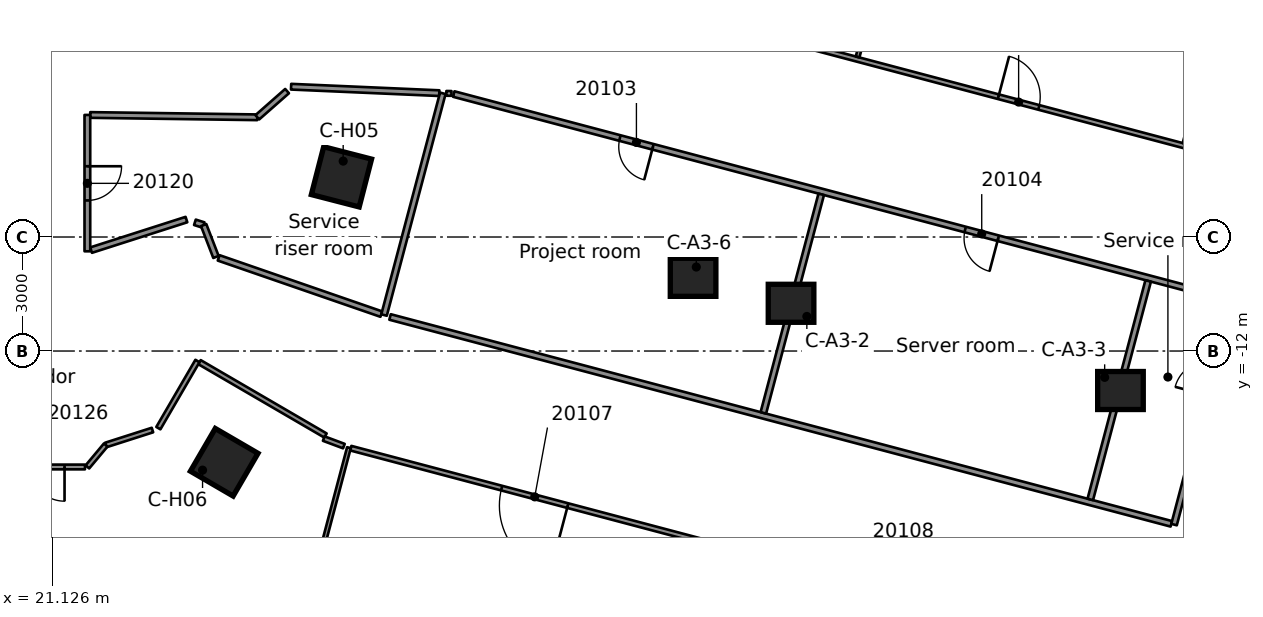
"""IFC4 building model, lengths in metres.
Left out: names, types, materials, properties, quantities, classifications, styles, units other than length and angle.
Written with IfcOpenShell. Run it as: python <this file> out.ifc"""

import sys

from ifc_helpers import new_model, si_unit, direction, frame, frame_2d, origin, origin_2d, place, context, subcontext, project, spatial, rectangle, extrude, element, fill, save


model = new_model("IFC4")
c1 = context("Model", 3, precision=1e-05, world=origin(), true_north=direction((0.0, 1.0)))
c2 = subcontext(c1, "Body", "Model", "MODEL_VIEW")
j1 = project(units=[si_unit("LENGTHUNIT", "METRE"), si_unit("PLANEANGLEUNIT", "RADIAN")], contexts=[c1])
p1 = place(None, origin())
s1 = spatial("IfcSite", under=j1, at=p1, CompositionType="ELEMENT")
p2 = place(p1, origin())
s2 = spatial("IfcBuilding", under=s1, at=p2, CompositionType="ELEMENT")
p3 = place(p2, frame((0.0, 0.0, 102.2)))
s3 = spatial("IfcBuildingStorey", under=s2, at=p3, CompositionType="ELEMENT", Elevation=102.2)
for number, where, z_axis, x_axis in (
    (1, (40.568, -10.744, 0.0), (0.0, 0.0, 1.0), (1.0, 0.0, 0.0)),
    (2, (49.236, -13.039, 0.0), (0.0, 0.0, 1.0), (1.0, 0.0, 0.0)),
    (3, (37.99, -10.061, 0.0), (0.0, 0.0, 1.0), (1.0, 0.0, 0.0)),
):
    element("IfcColumn", number, at=place(p3, frame(where, z_axis=z_axis, x_axis=x_axis)), inside=s3, PredefinedType="COLUMN", context=c2, shape_type="SweptSolid", body=[
        extrude(rectangle(XDim=1.2, YDim=1.0, at=origin_2d()), origin(), (0.0, 0.0, 1.0), 3.5),
    ])
for number, where, z_axis, x_axis in (
    (4, (28.737, -7.417, 0.0), (0.0, 0.0, 1.0), (0.968, -0.25, 0.0)),
    (5, (25.652, -14.927, 0.0), (0.0, 0.0, 1.0), (0.864, -0.503, 0.0)),
):
    element("IfcColumn", number, at=place(p3, frame(where, z_axis=z_axis, x_axis=x_axis)), inside=s3, PredefinedType="COLUMN", context=c2, shape_type="SweptSolid", body=[
        extrude(rectangle(XDim=1.3, YDim=1.3, at=origin_2d()), origin(), (0.0, 0.0, 1.0), 3.5),
    ])
p4 = place(p3, frame((25.002, -12.293, 0.0), z_axis=(0.0, 0.0, 1.0), x_axis=(0.864207961663, -0.503134772201, 0.0)))
e6 = element("IfcWall", 6, at=p4, inside=s3, PredefinedType="PARTITIONING", context=c2, shape_type="SweptSolid", body=[
    extrude(rectangle(XDim=3.836, YDim=0.125, at=frame_2d((1.918, 0.0))), origin(), (0.0, 0.0, 1.0), 3.08),
])
p5 = place(p3, frame((28.271, -14.304, 0.0), z_axis=(0.0, 0.0, 1.0), x_axis=(0.936771746221, -0.34994098857, 0.0)))
e7 = element("IfcWall", 7, at=p5, inside=s3, PredefinedType="PARTITIONING", context=c2, shape_type="SweptSolid", body=[
    extrude(rectangle(XDim=0.566, YDim=0.125, at=frame_2d((0.283, 0.0))), origin(), (0.0, 0.0, 1.0), 3.08),
])
p6 = place(p3, frame((29.787, -11.029, 0.0), z_axis=(0.0, 0.0, 1.0), x_axis=(-0.945116082169, 0.326734741381, 0.0)))
e8 = element("IfcWall", 8, at=p6, inside=s3, PredefinedType="PARTITIONING", context=c2, shape_type="SweptSolid", body=[
    extrude(rectangle(XDim=4.53, YDim=0.15, at=frame_2d((2.265, 0.0))), origin(), (0.0, 0.0, 1.0), 3.08),
])
p7 = place(p3, frame((24.881, -8.613, 0.0), z_axis=(0.0, 0.0, 1.0), x_axis=(0.953138161639, -0.302535361285, 0.0)))
e9 = element("IfcWall", 9, at=p7, inside=s3, PredefinedType="PARTITIONING", context=c2, shape_type="SweptSolid", body=[
    extrude(rectangle(XDim=0.241, YDim=0.15, at=frame_2d((0.121, 0.0))), origin(), (0.0, 0.0, 1.0), 3.08),
])
p8 = place(p3, frame((52.916, -20.892, 0.0), z_axis=(0.0, 0.0, 1.0), x_axis=(-0.966698340064, 0.255918579469, 0.0)))
e10 = element("IfcWall", 10, at=p8, inside=s3, PredefinedType="PARTITIONING", context=c2, shape_type="SweptSolid", body=[
    extrude(rectangle(XDim=24.759, YDim=0.125, at=frame_2d((12.379, 0.0))), origin(), (0.0, 0.0, 1.0), 3.08),
])
p9 = place(p8, frame((2.351, 0.0, 0.0)))
e11 = element("IfcOpeningElement", 11, at=p9, cuts=e10, PredefinedType="OPENING", context=c2, shape_type="SweptSolid", body=[
    extrude(rectangle(XDim=0.9, YDim=2.1, at=frame_2d((0.45, 1.05))), frame((0.0, 0.073, 0.0), z_axis=(0.0, -1.0, 0.0), x_axis=(1.0, 0.0, 0.0)), (0.0, 0.0, 1.0), 0.145),
])
p10 = place(p8, frame((18.851, 0.0, 0.0)))
e12 = element("IfcOpeningElement", 12, at=p10, cuts=e10, PredefinedType="OPENING", context=c2, shape_type="SweptSolid", body=[
    extrude(rectangle(XDim=1.8, YDim=2.1, at=frame_2d((0.9, 1.05))), frame((0.0, 0.073, 0.0), z_axis=(0.0, -1.0, 0.0), x_axis=(1.0, 0.0, 0.0)), (0.0, 0.0, 1.0), 0.145),
])
p11 = place(p8, frame((9.451, 0.0, 0.0)))
e13 = element("IfcOpeningElement", 13, at=p11, cuts=e10, PredefinedType="OPENING", context=c2, shape_type="SweptSolid", body=[
    extrude(rectangle(XDim=1.1, YDim=2.1, at=frame_2d((0.55, 1.05))), frame((0.0, 0.073, 0.0), z_axis=(0.0, -1.0, 0.0), x_axis=(1.0, 0.0, 0.0)), (0.0, 0.0, 1.0), 0.145),
])
p12 = place(p3, frame((30.016, -11.104, 0.0), z_axis=(0.0, 0.0, 1.0), x_axis=(0.966689773776, -0.255950935293, 0.0)))
e14 = element("IfcWall", 14, at=p12, inside=s3, PredefinedType="PARTITIONING", context=c2, shape_type="SweptSolid", body=[
    extrude(rectangle(XDim=21.266, YDim=0.15, at=frame_2d((10.633, 0.0))), origin(), (0.0, 0.0, 1.0), 3.08),
])
p13 = place(p3, frame((52.134, -10.652, 0.0), z_axis=(0.0, 0.0, 1.0), x_axis=(-0.966671200414, 0.25602107392, 0.0)))
e15 = element("IfcWall", 15, at=p13, inside=s3, PredefinedType="PARTITIONING", context=c2, shape_type="SweptSolid", body=[
    extrude(rectangle(XDim=21.147, YDim=0.15, at=frame_2d((10.573, 0.0))), origin(), (0.0, 0.0, 1.0), 3.08),
])
p14 = place(p13, frame((15.724, 0.0, 0.0)))
e16 = element("IfcOpeningElement", 16, at=p14, cuts=e15, PredefinedType="OPENING", context=c2, shape_type="SweptSolid", body=[
    extrude(rectangle(XDim=0.9, YDim=2.1, at=frame_2d((0.45, 1.05))), frame((0.0, 0.085, 0.0), z_axis=(0.0, -1.0, 0.0), x_axis=(1.0, 0.0, 0.0)), (0.0, 0.0, 1.0), 0.17),
])
p15 = place(p13, frame((6.324, 0.0, 0.0)))
e17 = element("IfcOpeningElement", 17, at=p15, cuts=e15, PredefinedType="OPENING", context=c2, shape_type="SweptSolid", body=[
    extrude(rectangle(XDim=0.9, YDim=2.1, at=frame_2d((0.45, 1.05))), frame((0.0, 0.085, 0.0), z_axis=(0.0, -1.0, 0.0), x_axis=(1.0, 0.0, 0.0)), (0.0, 0.0, 1.0), 0.17),
])
p16 = place(p3, frame((32.976, -1.853, 0.0), z_axis=(0.0, 0.0, 1.0), x_axis=(0.966679949131, -0.255988038682, 0.0)))
e18 = element("IfcWall", 18, at=p16, inside=s3, PredefinedType="PARTITIONING", context=c2, shape_type="SweptSolid", body=[
    extrude(rectangle(XDim=24.387, YDim=0.125, at=frame_2d((12.194, 0.0))), origin(), (0.0, 0.0, 1.0), 3.08),
])
p17 = place(p16, frame((3.85, 0.0, 0.0)))
e19 = element("IfcOpeningElement", 19, at=p17, cuts=e18, PredefinedType="OPENING", context=c2, shape_type="SweptSolid", body=[
    extrude(rectangle(XDim=1.8, YDim=2.1, at=frame_2d((0.9, 1.05))), frame((0.0, 0.073, 0.0), z_axis=(0.0, -1.0, 0.0), x_axis=(1.0, 0.0, 0.0)), (0.0, 0.0, 1.0), 0.145),
])
p18 = place(p16, frame((13.499, 0.0, 0.0)))
e20 = element("IfcOpeningElement", 20, at=p18, cuts=e18, PredefinedType="OPENING", context=c2, shape_type="SweptSolid", body=[
    extrude(rectangle(XDim=1.1, YDim=2.1, at=frame_2d((0.55, 1.05))), frame((0.0, 0.073, 0.0), z_axis=(0.0, -1.0, 0.0), x_axis=(1.0, 0.0, 0.0)), (0.0, 0.0, 1.0), 0.145),
])
p19 = place(p3, frame((27.412, -5.045, 0.0), z_axis=(0.0, 0.0, 1.0), x_axis=(0.999048944575, -0.043602824945, 0.0)))
e21 = element("IfcWall", 21, at=p19, inside=s3, PredefinedType="PARTITIONING", context=c2, shape_type="SweptSolid", body=[
    extrude(rectangle(XDim=3.903, YDim=0.15, at=frame_2d((1.951, 0.0))), origin(), (0.0, 0.0, 1.0), 3.08),
])
p20 = place(p3, frame((22.126, -5.789, 0.0), z_axis=(0.0, 0.0, 1.0), x_axis=(0.999903670382, -0.013879839955, 0.0)))
e22 = element("IfcWall", 22, at=p20, inside=s3, PredefinedType="PARTITIONING", context=c2, shape_type="SweptSolid", body=[
    extrude(rectangle(XDim=4.397, YDim=0.15, at=frame_2d((2.199, 0.0))), origin(), (0.0, 0.0, 1.0), 3.08),
])
p21 = place(p3, frame((31.497, -5.22, 0.0), z_axis=(0.0, 0.0, 1.0), x_axis=(0.999895375943, -0.014465032563, 0.0)))
e23 = element("IfcWall", 23, at=p21, inside=s3, PredefinedType="PARTITIONING", context=c2, shape_type="SweptSolid", body=[
    extrude(rectangle(XDim=0.135, YDim=0.125, at=frame_2d((0.067, 0.0))), origin(), (0.0, 0.0, 1.0), 3.08),
])
p22 = place(p3, frame((21.988, -15.051, 0.0), z_axis=(0.0, 0.0, 1.0), x_axis=(-1.0, 0.0, 0.0)))
e24 = element("IfcWall", 24, at=p22, inside=s3, PredefinedType="PARTITIONING", context=c2, shape_type="SweptSolid", body=[
    extrude(rectangle(XDim=10.997, YDim=0.125, at=frame_2d((5.499, 0.0))), origin(), (0.0, 0.0, 1.0), 3.08),
])
p23 = place(p22, frame((6.087, 0.0, 0.0)))
e25 = element("IfcOpeningElement", 25, at=p23, cuts=e24, PredefinedType="OPENING", context=c2, shape_type="SweptSolid", body=[
    extrude(rectangle(XDim=0.9, YDim=2.1, at=frame_2d((0.45, 1.05))), frame((0.0, 0.073, 0.0), z_axis=(0.0, -1.0, 0.0), x_axis=(1.0, 0.0, 0.0)), (0.0, 0.0, 1.0), 0.145),
])
p24 = place(p22, frame((0.538, 0.0, 0.0)))
e26 = element("IfcOpeningElement", 26, at=p24, cuts=e24, PredefinedType="OPENING", context=c2, shape_type="SweptSolid", body=[
    extrude(rectangle(XDim=0.9, YDim=2.1, at=frame_2d((0.45, 1.05))), frame((0.0, 0.073, 0.0), z_axis=(0.0, -1.0, 0.0), x_axis=(1.0, 0.0, 0.0)), (0.0, 0.0, 1.0), 0.145),
])
p25 = place(p3, frame((22.534, -14.473, 0.0), z_axis=(0.0, 0.0, 1.0), x_axis=(0.952378042639, 0.304919766331, 0.0)))
e27 = element("IfcWall", 27, at=p25, inside=s3, PredefinedType="PARTITIONING", context=c2, shape_type="SweptSolid", body=[
    extrude(rectangle(XDim=1.292, YDim=0.125, at=frame_2d((0.646, 0.0))), origin(), (0.0, 0.0, 1.0), 3.08),
])
p26 = place(p3, frame((22.149, -9.345, 0.0), z_axis=(0.0, 0.0, 1.0), x_axis=(0.952306801054, 0.305142190899, 0.0)))
e28 = element("IfcWall", 28, at=p26, inside=s3, PredefinedType="PARTITIONING", context=c2, shape_type="SweptSolid", body=[
    extrude(rectangle(XDim=2.635, YDim=0.15, at=frame_2d((1.317, 0.0))), origin(), (0.0, 0.0, 1.0), 3.08),
])
p27 = place(p3, frame((23.919, -14.029, 0.0), z_axis=(0.0, 0.0, 1.0), x_axis=(0.503232487024, 0.864151065499, 0.0)))
e29 = element("IfcWall", 29, at=p27, inside=s3, PredefinedType="PARTITIONING", context=c2, shape_type="SweptSolid", body=[
    extrude(rectangle(XDim=2.045, YDim=0.125, at=frame_2d((1.022, 0.0))), origin(), (0.0, 0.0, 1.0), 3.08),
])
p28 = place(p3, frame((25.435, -9.525, 0.0), z_axis=(0.0, 0.0, 1.0), x_axis=(-0.360270423637, 0.932847909282, 0.0)))
e30 = element("IfcWall", 30, at=p28, inside=s3, PredefinedType="PARTITIONING", context=c2, shape_type="SweptSolid", body=[
    extrude(rectangle(XDim=0.899, YDim=0.15, at=frame_2d((0.45, 0.0))), origin(), (0.0, 0.0, 1.0), 3.08),
])
p29 = place(p3, frame((50.646, -16.567, 0.0), z_axis=(0.0, 0.0, 1.0), x_axis=(0.256234173413, 0.966614736271, 0.0)))
e31 = element("IfcWall", 31, at=p29, inside=s3, PredefinedType="PARTITIONING", context=c2, shape_type="SweptSolid", body=[
    extrude(rectangle(XDim=1.787, YDim=0.15, at=frame_2d((0.894, 0.0))), origin(), (0.0, 0.0, 1.0), 3.08),
])
p30 = place(p3, frame((48.442, -15.905, 0.0), z_axis=(0.0, 0.0, 1.0), x_axis=(0.256111443265, 0.96664726174, 0.0)))
e32 = element("IfcWall", 32, at=p30, inside=s3, PredefinedType="PARTITIONING", context=c2, shape_type="SweptSolid", body=[
    extrude(rectangle(XDim=5.947, YDim=0.15, at=frame_2d((2.974, 0.0))), origin(), (0.0, 0.0, 1.0), 3.08),
])
p31 = place(p3, frame((50.922, -6.542, 0.0), z_axis=(0.0, 0.0, 1.0), x_axis=(0.25602342398, 0.966670578001, 0.0)))
e33 = element("IfcWall", 33, at=p31, inside=s3, PredefinedType="PARTITIONING", context=c2, shape_type="SweptSolid", body=[
    extrude(rectangle(XDim=13.537, YDim=0.1, at=frame_2d((6.769, 0.0))), origin(), (0.0, 0.0, 1.0), 3.08),
])
p32 = place(p3, frame((39.839, -13.627, 0.0), z_axis=(0.0, 0.0, 1.0), x_axis=(0.256032445662, 0.966668188557, 0.0)))
e34 = element("IfcWall", 34, at=p32, inside=s3, PredefinedType="PARTITIONING", context=c2, shape_type="SweptSolid", body=[
    extrude(rectangle(XDim=5.948, YDim=0.15, at=frame_2d((2.974, 0.0))), origin(), (0.0, 0.0, 1.0), 3.08),
])
p33 = place(p3, frame((42.319, -4.263, 0.0), z_axis=(0.0, 0.0, 1.0), x_axis=(0.255956011123, 0.966688429832, 0.0)))
e35 = element("IfcWall", 35, at=p33, inside=s3, PredefinedType="PARTITIONING", context=c2, shape_type="SweptSolid", body=[
    extrude(rectangle(XDim=13.537, YDim=0.1, at=frame_2d((6.769, 0.0))), origin(), (0.0, 0.0, 1.0), 3.08),
])
p34 = place(p3, frame((25.453, -27.689, 0.0), z_axis=(0.0, 0.0, 1.0), x_axis=(0.255987300487, 0.966680144613, 0.0)))
e36 = element("IfcWall", 36, at=p34, inside=s3, PredefinedType="PARTITIONING", context=c2, shape_type="SweptSolid", body=[
    extrude(rectangle(XDim=13.599, YDim=0.1, at=frame_2d((6.8, 0.0))), origin(), (0.0, 0.0, 1.0), 3.08),
])
p35 = place(p3, frame((29.858, -11.053, 0.0), z_axis=(0.0, 0.0, 1.0), x_axis=(0.256179404859, 0.966629252882, 0.0)))
e37 = element("IfcWall", 37, at=p35, inside=s3, PredefinedType="PARTITIONING", context=c2, shape_type="SweptSolid", body=[
    extrude(rectangle(XDim=6.035, YDim=0.15, at=frame_2d((3.018, 0.0))), origin(), (0.0, 0.0, 1.0), 3.08),
])
p36 = place(p3, frame((26.523, -5.85, 0.0), z_axis=(0.0, 0.0, 1.0), x_axis=(0.750616003207, 0.660738689446, 0.0)))
e38 = element("IfcWall", 38, at=p36, inside=s3, PredefinedType="PARTITIONING", context=c2, shape_type="SweptSolid", body=[
    extrude(rectangle(XDim=1.043, YDim=0.15, at=frame_2d((0.521, 0.0))), origin(), (0.0, 0.0, 1.0), 3.08),
])
p37 = place(p3, frame((22.051, -15.05, 0.0), z_axis=(0.0, 0.0, 1.0), x_axis=(0.641714843871, 0.766943321997, 0.0)))
e39 = element("IfcWall", 39, at=p37, inside=s3, PredefinedType="PARTITIONING", context=c2, shape_type="SweptSolid", body=[
    extrude(rectangle(XDim=0.752, YDim=0.125, at=frame_2d((0.376, 0.0))), origin(), (0.0, 0.0, 1.0), 3.08),
])
p38 = place(p3, frame((22.051, -5.788, 0.0), z_axis=(0.0, 0.0, 1.0), x_axis=(0.0, -1.0, 0.0)))
e40 = element("IfcWall", 40, at=p38, inside=s3, PredefinedType="PARTITIONING", context=c2, shape_type="SweptSolid", body=[
    extrude(rectangle(XDim=3.588, YDim=0.15, at=frame_2d((1.794, 0.0))), origin(), (0.0, 0.0, 1.0), 3.08),
])
p39 = place(p38, frame((1.35, 0.0, 0.0)))
e41 = element("IfcOpeningElement", 41, at=p39, cuts=e40, PredefinedType="OPENING", context=c2, shape_type="SweptSolid", body=[
    extrude(rectangle(XDim=0.9, YDim=2.1, at=frame_2d((0.45, 1.05))), frame((0.0, 0.085, 0.0), z_axis=(0.0, -1.0, 0.0), x_axis=(1.0, 0.0, 0.0)), (0.0, 0.0, 1.0), 0.17),
])
p40 = place(p18, origin())
e42 = element("IfcDoor", 42, at=p40, inside=s3, OperationType="SINGLE_SWING_RIGHT", PredefinedType="DOOR", context=c2, shape_type="SweptSolid", body=[
    extrude(rectangle(XDim=1.1, YDim=2.1, at=frame_2d((0.55, 1.05))), frame((0.0, 0.025, 0.0), z_axis=(0.0, -1.0, 0.0), x_axis=(1.0, 0.0, 0.0)), (0.0, 0.0, 1.0), 0.05),
])
fill(e20, e42)
p41 = place(p14, origin())
e43 = element("IfcDoor", 43, at=p41, inside=s3, OperationType="SINGLE_SWING_RIGHT", PredefinedType="DOOR", context=c2, shape_type="SweptSolid", body=[
    extrude(rectangle(XDim=0.9, YDim=2.1, at=frame_2d((0.45, 1.05))), frame((0.0, 0.025, 0.0), z_axis=(0.0, -1.0, 0.0), x_axis=(1.0, 0.0, 0.0)), (0.0, 0.0, 1.0), 0.05),
])
fill(e16, e43)
p42 = place(p15, origin())
e44 = element("IfcDoor", 44, at=p42, inside=s3, OperationType="SINGLE_SWING_LEFT", PredefinedType="DOOR", context=c2, shape_type="SweptSolid", body=[
    extrude(rectangle(XDim=0.9, YDim=2.1, at=frame_2d((0.45, 1.05))), frame((0.0, 0.025, 0.0), z_axis=(0.0, -1.0, 0.0), x_axis=(1.0, 0.0, 0.0)), (0.0, 0.0, 1.0), 0.05),
])
fill(e17, e44)
p43 = place(p10, origin())
e45 = element("IfcDoor", 45, at=p43, inside=s3, OperationType="DOUBLE_DOOR_SINGLE_SWING", PredefinedType="DOOR", context=c2, shape_type="SweptSolid", body=[
    extrude(rectangle(XDim=1.8, YDim=2.1, at=frame_2d((0.9, 1.05))), frame((0.0, 0.025, 0.0), z_axis=(0.0, -1.0, 0.0), x_axis=(1.0, 0.0, 0.0)), (0.0, 0.0, 1.0), 0.05),
])
fill(e12, e45)
p44 = place(p39, origin())
e46 = element("IfcDoor", 46, at=p44, inside=s3, OperationType="SINGLE_SWING_RIGHT", PredefinedType="DOOR", context=c2, shape_type="SweptSolid", body=[
    extrude(rectangle(XDim=0.9, YDim=2.1, at=frame_2d((0.45, 1.05))), frame((0.0, 0.025, 0.0), z_axis=(0.0, -1.0, 0.0), x_axis=(1.0, 0.0, 0.0)), (0.0, 0.0, 1.0), 0.05),
])
fill(e41, e46)
p45 = place(p24, origin())
e47 = element("IfcDoor", 47, at=p45, inside=s3, OperationType="SINGLE_SWING_LEFT", PredefinedType="DOOR", context=c2, shape_type="SweptSolid", body=[
    extrude(rectangle(XDim=0.9, YDim=2.1, at=frame_2d((0.45, 1.05))), frame((0.0, 0.025, 0.0), z_axis=(0.0, -1.0, 0.0), x_axis=(1.0, 0.0, 0.0)), (0.0, 0.0, 1.0), 0.05),
])
fill(e26, e47)
save(model, sys.argv[1])
